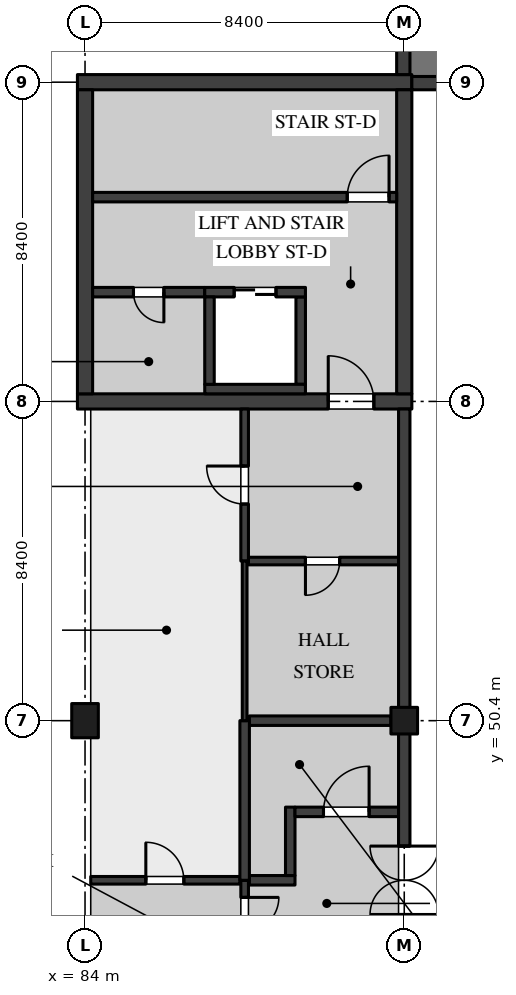
"""IFC4 building model, lengths in metres.
Left out: names, types, materials, properties, quantities, classifications, styles, units other than length and angle.
Written with IfcOpenShell. Run it as: python <this file> out.ifc"""

import sys

from ifc_helpers import new_model, si_unit, direction, frame, frame_2d, origin, origin_2d, place, context, subcontext, project, spatial, rectangle, extrude, element, fill, save


model = new_model("IFC4")
c1 = context("Model", 3, precision=1e-05, world=origin(), true_north=direction((0.0, 1.0)))
c2 = subcontext(c1, "Body", "Model", "MODEL_VIEW")
j1 = project(units=[si_unit("LENGTHUNIT", "METRE"), si_unit("PLANEANGLEUNIT", "RADIAN")], contexts=[c1])
p1 = place(None, origin())
s1 = spatial("IfcSite", under=j1, at=p1, CompositionType="ELEMENT")
p2 = place(p1, origin())
s2 = spatial("IfcBuilding", under=s1, at=p2, CompositionType="ELEMENT")
p3 = place(p2, frame((0.0, 0.0, 5.4)))
s3 = spatial("IfcBuildingStorey", under=s2, at=p3, CompositionType="ELEMENT", Elevation=5.4)
p4 = place(p3, frame((84.0, 50.4, 0.0), z_axis=(0.0, 0.0, 1.0), x_axis=(1.0, 0.0, 0.0)))
e1 = element("IfcColumn", 1, at=p4, inside=s3, PredefinedType="COLUMN", context=c2, shape_type="SweptSolid", body=[
    extrude(rectangle(XDim=0.7, YDim=0.9, at=origin_2d()), origin(), (0.0, 0.0, 1.0), 4.5),
])
p5 = place(p3, frame((92.4, 50.4, 0.0), z_axis=(0.0, 0.0, 1.0), x_axis=(1.0, 0.0, 0.0)))
e2 = element("IfcColumn", 2, at=p5, inside=s3, PredefinedType="COLUMN", context=c2, shape_type="SweptSolid", body=[
    extrude(rectangle(XDim=0.7, YDim=0.7, at=origin_2d()), origin(), (0.0, 0.0, 1.0), 4.5),
])
p6 = place(p3, frame((83.8, 58.8, 0.0), z_axis=(0.0, 0.0, 1.0), x_axis=(1.0, 0.0, 0.0)))
e3 = element("IfcWall", 3, at=p6, inside=s3, PredefinedType="SHEAR", context=c2, shape_type="SweptSolid", body=[
    extrude(rectangle(XDim=8.8, YDim=0.4, at=frame_2d((4.4, 0.0))), origin(), (0.0, 0.0, 1.0), 4.25),
])
p7 = place(p6, frame((6.6, 0.0, 0.0)))
e4 = element("IfcOpeningElement", 4, at=p7, cuts=e3, PredefinedType="OPENING", context=c2, shape_type="SweptSolid", body=[
    extrude(rectangle(XDim=1.2, YDim=2.1, at=frame_2d((0.6, 1.05))), frame((0.0, 0.21, 0.0), z_axis=(0.0, -1.0, 0.0), x_axis=(1.0, 0.0, 0.0)), (0.0, 0.0, 1.0), 0.42),
])
p8 = place(p3, frame((83.8, 67.2, 0.0), z_axis=(0.0, 0.0, 1.0), x_axis=(1.0, 0.0, 0.0)))
e5 = element("IfcWall", 5, at=p8, inside=s3, PredefinedType="SHEAR", context=c2, shape_type="SweptSolid", body=[
    extrude(rectangle(XDim=8.8, YDim=0.4, at=frame_2d((4.4, 0.0))), origin(), (0.0, 0.0, 1.0), 4.25),
])
for number, where, z_axis, x_axis in (
    (6, (84.0, 59.0, 0.0), (0.0, 0.0, 1.0), (0.0, 1.0, 0.0)),
    (7, (92.4, 59.0, 0.0), (0.0, 0.0, 1.0), (0.0, 1.0, 0.0)),
):
    element("IfcWall", number, at=place(p3, frame(where, z_axis=z_axis, x_axis=x_axis)), inside=s3, PredefinedType="SHEAR", context=c2, shape_type="SweptSolid", body=[
        extrude(rectangle(XDim=8.0, YDim=0.4, at=frame_2d((4.0, 0.0))), origin(), (0.0, 0.0, 1.0), 4.25),
    ])
p9 = place(p3, frame((92.2, 64.175, 0.0), z_axis=(0.0, 0.0, 1.0), x_axis=(-1.0, 0.0, 0.0)))
e8 = element("IfcWall", 8, at=p9, inside=s3, PredefinedType="SOLIDWALL", context=c2, shape_type="SweptSolid", body=[
    extrude(rectangle(XDim=8.0, YDim=0.25, at=frame_2d((4.0, 0.0))), origin(), (0.0, 0.0, 1.0), 4.25),
])
p10 = place(p9, frame((0.2, 0.0, 0.0)))
e9 = element("IfcOpeningElement", 9, at=p10, cuts=e8, PredefinedType="OPENING", context=c2, shape_type="SweptSolid", body=[
    extrude(rectangle(XDim=1.1, YDim=2.1, at=frame_2d((0.55, 1.05))), frame((0.0, 0.135, 0.0), z_axis=(0.0, -1.0, 0.0), x_axis=(1.0, 0.0, 0.0)), (0.0, 0.0, 1.0), 0.27),
])
p11 = place(p3, frame((87.15, 61.675, 0.0), z_axis=(0.0, 0.0, 1.0), x_axis=(-1.0, 0.0, 0.0)))
e10 = element("IfcWall", 10, at=p11, inside=s3, PredefinedType="SOLIDWALL", context=c2, shape_type="SweptSolid", body=[
    extrude(rectangle(XDim=2.95, YDim=0.25, at=frame_2d((1.475, 0.0))), origin(), (0.0, 0.0, 1.0), 4.25),
])
p12 = place(p11, frame((1.075, 0.0, 0.0)))
e11 = element("IfcOpeningElement", 11, at=p12, cuts=e10, PredefinedType="OPENING", context=c2, shape_type="SweptSolid", body=[
    extrude(rectangle(XDim=0.8, YDim=2.1, at=frame_2d((0.4, 1.05))), frame((0.0, 0.135, 0.0), z_axis=(0.0, -1.0, 0.0), x_axis=(1.0, 0.0, 0.0)), (0.0, 0.0, 1.0), 0.27),
])
p13 = place(p3, frame((89.675, 59.25, 0.0), z_axis=(0.0, 0.0, 1.0), x_axis=(0.0, 1.0, 0.0)))
e12 = element("IfcWall", 12, at=p13, inside=s3, PredefinedType="SOLIDWALL", context=c2, shape_type="SweptSolid", body=[
    extrude(rectangle(XDim=2.3, YDim=0.25, at=frame_2d((1.15, 0.0))), origin(), (0.0, 0.0, 1.0), 4.25),
])
p14 = place(p3, frame((87.15, 61.675, 0.0), z_axis=(0.0, 0.0, 1.0), x_axis=(1.0, 0.0, 0.0)))
e13 = element("IfcWall", 13, at=p14, inside=s3, PredefinedType="SOLIDWALL", context=c2, shape_type="SweptSolid", body=[
    extrude(rectangle(XDim=2.65, YDim=0.25, at=frame_2d((1.325, 0.0))), origin(), (0.0, 0.0, 1.0), 4.25),
])
p15 = place(p14, frame((0.775, 0.0, 0.0)))
e14 = element("IfcOpeningElement", 14, at=p15, cuts=e13, PredefinedType="OPENING", context=c2, shape_type="SweptSolid", body=[
    extrude(rectangle(XDim=1.1, YDim=2.1, at=frame_2d((0.55, 1.05))), frame((0.0, 0.135, 0.0), z_axis=(0.0, -1.0, 0.0), x_axis=(1.0, 0.0, 0.0)), (0.0, 0.0, 1.0), 0.27),
])
p16 = place(p3, frame((87.15, 59.125, 0.0), z_axis=(0.0, 0.0, 1.0), x_axis=(1.0, 0.0, 0.0)))
e15 = element("IfcWall", 15, at=p16, inside=s3, PredefinedType="SOLIDWALL", context=c2, shape_type="SweptSolid", body=[
    extrude(rectangle(XDim=2.65, YDim=0.25, at=frame_2d((1.325, 0.0))), origin(), (0.0, 0.0, 1.0), 4.25),
])
p17 = place(p3, frame((87.275, 59.25, 0.0), z_axis=(0.0, 0.0, 1.0), x_axis=(0.0, 1.0, 0.0)))
e16 = element("IfcWall", 16, at=p17, inside=s3, PredefinedType="SOLIDWALL", context=c2, shape_type="SweptSolid", body=[
    extrude(rectangle(XDim=2.3, YDim=0.25, at=frame_2d((1.15, 0.0))), origin(), (0.0, 0.0, 1.0), 4.25),
])
p18 = place(p2, origin())
s4 = spatial("IfcBuildingStorey", under=s2, at=p18, CompositionType="ELEMENT", Elevation=0.0)
p19 = place(p18, frame((84.0, 54.6, 0.0), z_axis=(0.0, 0.0, 1.0), x_axis=(0.0, 1.0, 0.0)))
e17 = element("IfcWall", 17, at=p19, inside=s4, PredefinedType="PARTITIONING", context=c2, shape_type="SweptSolid", body=[
    extrude(rectangle(XDim=4.0, YDim=0.2, at=frame_2d((2.0, 0.0))), origin(), (0.0, 0.0, 1.0), 18.77),
])
p20 = place(p19, frame((1.5, 0.0, 0.0)))
e18 = element("IfcOpeningElement", 18, at=p20, cuts=e17, PredefinedType="OPENING", context=c2, shape_type="SweptSolid", body=[
    extrude(rectangle(XDim=1.0, YDim=2.4, at=frame_2d((0.5, 1.2))), frame((0.0, 0.11, 0.0), z_axis=(0.0, -1.0, 0.0), x_axis=(1.0, 0.0, 0.0)), (0.0, 0.0, 1.0), 0.22),
])
p21 = place(p18, frame((84.0, 42.2, 0.0), z_axis=(0.0, 0.0, 1.0), x_axis=(0.0, 1.0, 0.0)))
e19 = element("IfcWall", 19, at=p21, inside=s4, PredefinedType="PARTITIONING", context=c2, shape_type="SweptSolid", body=[
    extrude(rectangle(XDim=4.0, YDim=0.2, at=frame_2d((2.0, 0.0))), origin(), (0.0, 0.0, 1.0), 18.77),
])
p22 = place(p21, frame((1.5, 0.0, 0.0)))
e20 = element("IfcOpeningElement", 20, at=p22, cuts=e19, PredefinedType="OPENING", context=c2, shape_type="SweptSolid", body=[
    extrude(rectangle(XDim=1.0, YDim=2.4, at=frame_2d((0.5, 1.2))), frame((0.0, 0.11, 0.0), z_axis=(0.0, -1.0, 0.0), x_axis=(1.0, 0.0, 0.0)), (0.0, 0.0, 1.0), 0.22),
])
p23 = place(p18, frame((84.0, 46.2, 0.0), z_axis=(0.0, 0.0, 1.0), x_axis=(0.0, 1.0, 0.0)))
e21 = element("IfcWall", 21, at=p23, inside=s4, PredefinedType="PARTITIONING", context=c2, shape_type="SweptSolid", body=[
    extrude(rectangle(XDim=2.4, YDim=0.125, at=frame_2d((1.2, 0.0))), origin(), (0.0, 0.0, 1.0), 18.77),
])
p24 = place(p18, frame((84.0, 48.6, 0.0), z_axis=(0.0, 0.0, 1.0), x_axis=(0.0, 1.0, 0.0)))
e22 = element("IfcWall", 22, at=p24, inside=s4, PredefinedType="PARTITIONING", context=c2, shape_type="SweptSolid", body=[
    extrude(rectangle(XDim=1.35, YDim=0.125, at=frame_2d((0.675, 0.0))), origin(), (0.0, 0.0, 1.0), 18.77),
])
p25 = place(p18, frame((84.0, 50.85, 0.0), z_axis=(0.0, 0.0, 1.0), x_axis=(0.0, 1.0, 0.0)))
e23 = element("IfcWall", 23, at=p25, inside=s4, PredefinedType="PARTITIONING", context=c2, shape_type="SweptSolid", body=[
    extrude(rectangle(XDim=3.75, YDim=0.125, at=frame_2d((1.875, 0.0))), origin(), (0.0, 0.0, 1.0), 18.77),
])
p26 = place(p18, frame((79.9, 63.0, 0.0), z_axis=(0.0, 0.0, 1.0), x_axis=(1.0, 0.0, 0.0)))
e24 = element("IfcWall", 24, at=p26, inside=s4, PredefinedType="PARTITIONING", context=c2, shape_type="SweptSolid", body=[
    extrude(rectangle(XDim=3.9, YDim=0.2, at=frame_2d((1.95, 0.0))), origin(), (0.0, 0.0, 1.0), 18.77),
])
p27 = place(p26, frame((1.45, 0.0, 0.0)))
e25 = element("IfcOpeningElement", 25, at=p27, cuts=e24, PredefinedType="OPENING", context=c2, shape_type="SweptSolid", body=[
    extrude(rectangle(XDim=1.0, YDim=2.1, at=frame_2d((0.5, 1.05))), frame((0.0, 0.11, 0.0), z_axis=(0.0, -1.0, 0.0), x_axis=(1.0, 0.0, 0.0)), (0.0, 0.0, 1.0), 0.22),
])
p28 = place(p3, frame((88.2, 44.4, 0.0), z_axis=(0.0, 0.0, 1.0), x_axis=(0.0, 1.0, 0.0)))
e26 = element("IfcWall", 26, at=p28, inside=s3, PredefinedType="PARTITIONING", context=c2, shape_type="SweptSolid", body=[
    extrude(rectangle(XDim=1.8, YDim=0.2, at=frame_2d((0.9, 0.0))), origin(), (0.0, 0.0, 1.0), 4.25),
])
p29 = place(p28, frame((0.45, 0.0, 0.0)))
e27 = element("IfcOpeningElement", 27, at=p29, cuts=e26, PredefinedType="OPENING", context=c2, shape_type="SweptSolid", body=[
    extrude(rectangle(XDim=0.9, YDim=2.1, at=frame_2d((0.45, 1.05))), frame((0.0, 0.11, 0.0), z_axis=(0.0, -1.0, 0.0), x_axis=(1.0, 0.0, 0.0)), (0.0, 0.0, 1.0), 0.22),
])
p30 = place(p3, frame((88.325, 46.2, 0.0), z_axis=(0.0, 0.0, 1.0), x_axis=(1.0, 0.0, 0.0)))
e28 = element("IfcWall", 28, at=p30, inside=s3, PredefinedType="PARTITIONING", context=c2, shape_type="SweptSolid", body=[
    extrude(rectangle(XDim=1.2, YDim=0.25, at=frame_2d((0.6, 0.0))), origin(), (0.0, 0.0, 1.0), 4.25),
])
p31 = place(p3, frame((89.4, 46.325, 0.0), z_axis=(0.0, 0.0, 1.0), x_axis=(0.0, 1.0, 0.0)))
e29 = element("IfcWall", 29, at=p31, inside=s3, PredefinedType="PARTITIONING", context=c2, shape_type="SweptSolid", body=[
    extrude(rectangle(XDim=1.8, YDim=0.25, at=frame_2d((0.9, 0.0))), origin(), (0.0, 0.0, 1.0), 4.25),
])
p32 = place(p3, frame((89.525, 48.0, 0.0), z_axis=(0.0, 0.0, 1.0), x_axis=(1.0, 0.0, 0.0)))
e30 = element("IfcWall", 30, at=p32, inside=s3, PredefinedType="PARTITIONING", context=c2, shape_type="SweptSolid", body=[
    extrude(rectangle(XDim=2.725, YDim=0.25, at=frame_2d((1.363, 0.0))), origin(), (0.0, 0.0, 1.0), 4.25),
])
p33 = place(p32, frame((0.75, 0.0, 0.0)))
e31 = element("IfcOpeningElement", 31, at=p33, cuts=e30, PredefinedType="OPENING", context=c2, shape_type="SweptSolid", body=[
    extrude(rectangle(XDim=1.2, YDim=2.4, at=frame_2d((0.6, 1.2))), frame((0.0, 0.135, 0.0), z_axis=(0.0, -1.0, 0.0), x_axis=(1.0, 0.0, 0.0)), (0.0, 0.0, 1.0), 0.27),
])
p34 = place(p3, frame((88.3, 54.6, 0.0), z_axis=(0.0, 0.0, 1.0), x_axis=(1.0, 0.0, 0.0)))
e32 = element("IfcWall", 32, at=p34, inside=s3, PredefinedType="PARTITIONING", context=c2, shape_type="SweptSolid", body=[
    extrude(rectangle(XDim=3.95, YDim=0.2, at=frame_2d((1.975, 0.0))), origin(), (0.0, 0.0, 1.0), 4.25),
])
p35 = place(p34, frame((1.5, 0.0, 0.0)))
e33 = element("IfcOpeningElement", 33, at=p35, cuts=e32, PredefinedType="OPENING", context=c2, shape_type="SweptSolid", body=[
    extrude(rectangle(XDim=0.9, YDim=2.1, at=frame_2d((0.45, 1.05))), frame((0.0, 0.11, 0.0), z_axis=(0.0, -1.0, 0.0), x_axis=(1.0, 0.0, 0.0)), (0.0, 0.0, 1.0), 0.22),
])
p36 = place(p3, frame((88.2, 54.6, 0.0), z_axis=(0.0, 0.0, 1.0), x_axis=(0.0, 1.0, 0.0)))
e34 = element("IfcWall", 34, at=p36, inside=s3, PredefinedType="PARTITIONING", context=c2, shape_type="SweptSolid", body=[
    extrude(rectangle(XDim=4.0, YDim=0.2, at=frame_2d((2.0, 0.0))), origin(), (0.0, 0.0, 1.0), 4.25),
])
p37 = place(p36, frame((1.5, 0.0, 0.0)))
e35 = element("IfcOpeningElement", 35, at=p37, cuts=e34, PredefinedType="OPENING", context=c2, shape_type="SweptSolid", body=[
    extrude(rectangle(XDim=1.0, YDim=2.4, at=frame_2d((0.5, 1.2))), frame((0.0, 0.11, 0.0), z_axis=(0.0, -1.0, 0.0), x_axis=(1.0, 0.0, 0.0)), (0.0, 0.0, 1.0), 0.22),
])
p38 = place(p3, frame((84.15, 46.2, 0.0), z_axis=(0.0, 0.0, 1.0), x_axis=(1.0, 0.0, 0.0)))
e36 = element("IfcWall", 36, at=p38, inside=s3, PredefinedType="PARTITIONING", context=c2, shape_type="SweptSolid", body=[
    extrude(rectangle(XDim=3.925, YDim=0.2, at=frame_2d((1.962, 0.0))), origin(), (0.0, 0.0, 1.0), 4.25),
])
p39 = place(p38, frame((1.45, 0.0, 0.0)))
e37 = element("IfcOpeningElement", 37, at=p39, cuts=e36, PredefinedType="OPENING", context=c2, shape_type="SweptSolid", body=[
    extrude(rectangle(XDim=1.0, YDim=2.4, at=frame_2d((0.5, 1.2))), frame((0.0, 0.11, 0.0), z_axis=(0.0, -1.0, 0.0), x_axis=(1.0, 0.0, 0.0)), (0.0, 0.0, 1.0), 0.22),
])
p40 = place(p3, frame((88.325, 50.4, 0.0), z_axis=(0.0, 0.0, 1.0), x_axis=(1.0, 0.0, 0.0)))
e38 = element("IfcWall", 38, at=p40, inside=s3, PredefinedType="PARTITIONING", context=c2, shape_type="SweptSolid", body=[
    extrude(rectangle(XDim=3.725, YDim=0.25, at=frame_2d((1.863, 0.0))), origin(), (0.0, 0.0, 1.0), 4.25),
])
p41 = place(p3, frame((88.2, 46.2, 0.0), z_axis=(0.0, 0.0, 1.0), x_axis=(0.0, 1.0, 0.0)))
e39 = element("IfcWall", 39, at=p41, inside=s3, PredefinedType="PARTITIONING", context=c2, shape_type="SweptSolid", body=[
    extrude(rectangle(XDim=4.2, YDim=0.25, at=frame_2d((2.1, 0.0))), origin(), (0.0, 0.0, 1.0), 4.25),
])
p42 = place(p3, frame((88.2, 50.4, 0.0), z_axis=(0.0, 0.0, 1.0), x_axis=(0.0, 1.0, 0.0)))
e40 = element("IfcWall", 40, at=p42, inside=s3, PredefinedType="PARTITIONING", context=c2, shape_type="SweptSolid", body=[
    extrude(rectangle(XDim=4.2, YDim=0.125, at=frame_2d((2.1, 0.0))), origin(), (0.0, 0.0, 1.0), 4.25),
])
p43 = place(p3, frame((92.375, 75.4, 0.0), z_axis=(0.0, 0.0, 1.0), x_axis=(0.0, -1.0, 0.0)))
e41 = element("IfcWall", 41, at=p43, inside=s3, PredefinedType="SOLIDWALL", context=c2, shape_type="SweptSolid", body=[
    extrude(rectangle(XDim=8.0, YDim=0.35, at=frame_2d((4.0, 0.0))), origin(), (0.0, 0.0, 1.0), 3.746),
])
p44 = place(p43, frame((2.8, 0.0, 1.5)))
e42 = element("IfcOpeningElement", 42, at=p44, cuts=e41, PredefinedType="OPENING", context=c2, shape_type="SweptSolid", body=[
    extrude(rectangle(XDim=0.3, YDim=1.5, at=frame_2d((0.15, 0.75))), frame((0.0, 0.185, 0.0), z_axis=(0.0, -1.0, 0.0), x_axis=(1.0, 0.0, 0.0)), (0.0, 0.0, 1.0), 0.37),
])
p45 = place(p43, frame((4.45, 0.0, 1.5)))
e43 = element("IfcOpeningElement", 43, at=p45, cuts=e41, PredefinedType="OPENING", context=c2, shape_type="SweptSolid", body=[
    extrude(rectangle(XDim=1.2, YDim=1.5, at=frame_2d((0.6, 0.75))), frame((0.0, 0.185, 0.0), z_axis=(0.0, -1.0, 0.0), x_axis=(1.0, 0.0, 0.0)), (0.0, 0.0, 1.0), 0.37),
])
p46 = place(p43, frame((7.0, 0.0, 1.5)))
e44 = element("IfcOpeningElement", 44, at=p46, cuts=e41, PredefinedType="OPENING", context=c2, shape_type="SweptSolid", body=[
    extrude(rectangle(XDim=0.3, YDim=1.5, at=frame_2d((0.15, 0.75))), frame((0.0, 0.185, 0.0), z_axis=(0.0, -1.0, 0.0), x_axis=(1.0, 0.0, 0.0)), (0.0, 0.0, 1.0), 0.37),
])
p47 = place(p3, frame((92.6, 67.175, 0.0), z_axis=(0.0, 0.0, 1.0), x_axis=(1.0, 0.0, 0.0)))
e45 = element("IfcWall", 45, at=p47, inside=s3, PredefinedType="SOLIDWALL", context=c2, shape_type="SweptSolid", body=[
    extrude(rectangle(XDim=7.77, YDim=0.35, at=frame_2d((3.885, 0.0))), origin(), (0.0, 0.0, 1.0), 3.746),
])
p48 = place(p47, frame((0.7, 0.0, 1.5)))
e46 = element("IfcOpeningElement", 46, at=p48, cuts=e45, PredefinedType="OPENING", context=c2, shape_type="SweptSolid", body=[
    extrude(rectangle(XDim=0.3, YDim=1.5, at=frame_2d((0.15, 0.75))), frame((0.0, 0.185, 0.0), z_axis=(0.0, -1.0, 0.0), x_axis=(1.0, 0.0, 0.0)), (0.0, 0.0, 1.0), 0.37),
])
p49 = place(p47, frame((2.35, 0.0, 1.5)))
e47 = element("IfcOpeningElement", 47, at=p49, cuts=e45, PredefinedType="OPENING", context=c2, shape_type="SweptSolid", body=[
    extrude(rectangle(XDim=1.2, YDim=1.5, at=frame_2d((0.6, 0.75))), frame((0.0, 0.185, 0.0), z_axis=(0.0, -1.0, 0.0), x_axis=(1.0, 0.0, 0.0)), (0.0, 0.0, 1.0), 0.37),
])
p50 = place(p47, frame((4.9, 0.0, 1.5)))
e48 = element("IfcOpeningElement", 48, at=p50, cuts=e45, PredefinedType="OPENING", context=c2, shape_type="SweptSolid", body=[
    extrude(rectangle(XDim=0.3, YDim=1.5, at=frame_2d((0.15, 0.75))), frame((0.0, 0.185, 0.0), z_axis=(0.0, -1.0, 0.0), x_axis=(1.0, 0.0, 0.0)), (0.0, 0.0, 1.0), 0.37),
])
p51 = place(p3, frame((92.4, 42.2, 0.0), z_axis=(0.0, 0.0, 1.0), x_axis=(0.0, 1.0, 0.0)))
e49 = element("IfcWall", 49, at=p51, inside=s3, PredefinedType="SOLIDWALL", context=c2, shape_type="SweptSolid", body=[
    extrude(rectangle(XDim=7.87, YDim=0.3, at=frame_2d((3.935, 0.0))), origin(), (0.0, 0.0, 1.0), 4.5),
])
p52 = place(p51, frame((3.1, 0.0, 0.0)))
e50 = element("IfcOpeningElement", 50, at=p52, cuts=e49, PredefinedType="OPENING", context=c2, shape_type="SweptSolid", body=[
    extrude(rectangle(XDim=1.8, YDim=2.4, at=frame_2d((0.9, 1.2))), frame((0.0, 0.16, 0.0), z_axis=(0.0, -1.0, 0.0), x_axis=(1.0, 0.0, 0.0)), (0.0, 0.0, 1.0), 0.32),
])
p53 = place(p3, frame((92.4, 50.73, 0.0), z_axis=(0.0, 0.0, 1.0), x_axis=(0.0, 1.0, 0.0)))
e51 = element("IfcWall", 51, at=p53, inside=s3, PredefinedType="SOLIDWALL", context=c2, shape_type="SweptSolid", body=[
    extrude(rectangle(XDim=7.87, YDim=0.3, at=frame_2d((3.935, 0.0))), origin(), (0.0, 0.0, 1.0), 4.5),
])
p54 = place(p7, origin())
e52 = element("IfcDoor", 52, at=p54, inside=s3, OperationType="SINGLE_SWING_RIGHT", PredefinedType="DOOR", context=c2, shape_type="SweptSolid", body=[
    extrude(rectangle(XDim=1.2, YDim=2.1, at=frame_2d((0.6, 1.05))), frame((0.0, 0.035, 0.0), z_axis=(0.0, -1.0, 0.0), x_axis=(1.0, 0.0, 0.0)), (0.0, 0.0, 1.0), 0.07),
])
fill(e4, e52)
p55 = place(p12, origin())
e53 = element("IfcDoor", 53, at=p55, inside=s3, OperationType="SINGLE_SWING_RIGHT", PredefinedType="DOOR", context=c2, shape_type="SweptSolid", body=[
    extrude(rectangle(XDim=0.8, YDim=2.1, at=frame_2d((0.4, 1.05))), frame((0.0, 0.035, 0.0), z_axis=(0.0, -1.0, 0.0), x_axis=(1.0, 0.0, 0.0)), (0.0, 0.0, 1.0), 0.07),
])
fill(e11, e53)
p56 = place(p10, frame((1.1, 0.0, 0.0), z_axis=(0.0, 0.0, 1.0), x_axis=(-1.0, 0.0, 0.0)))
e54 = element("IfcDoor", 54, at=p56, inside=s3, OperationType="SINGLE_SWING_LEFT", PredefinedType="DOOR", context=c2, shape_type="SweptSolid", body=[
    extrude(rectangle(XDim=1.1, YDim=2.1, at=frame_2d((0.55, 1.05))), frame((0.0, 0.035, 0.0), z_axis=(0.0, -1.0, 0.0), x_axis=(1.0, 0.0, 0.0)), (0.0, 0.0, 1.0), 0.07),
])
fill(e9, e54)
p57 = place(p15, origin())
e55 = element("IfcDoor", 55, at=p57, inside=s3, OperationType="DOUBLE_DOOR_SLIDING", PredefinedType="DOOR", context=c2, shape_type="SweptSolid", body=[
    extrude(rectangle(XDim=1.1, YDim=2.1, at=frame_2d((0.55, 1.05))), frame((0.0, 0.04, 0.0), z_axis=(0.0, -1.0, 0.0), x_axis=(1.0, 0.0, 0.0)), (0.0, 0.0, 1.0), 0.08),
])
fill(e14, e55)
p58 = place(p29, frame((0.9, 0.0, 0.0), z_axis=(0.0, 0.0, 1.0), x_axis=(-1.0, 0.0, 0.0)))
e56 = element("IfcDoor", 56, at=p58, inside=s3, OperationType="SINGLE_SWING_RIGHT", PredefinedType="DOOR", context=c2, shape_type="SweptSolid", body=[
    extrude(rectangle(XDim=0.9, YDim=2.1, at=frame_2d((0.45, 1.05))), frame((0.0, 0.03, 0.0), z_axis=(0.0, -1.0, 0.0), x_axis=(1.0, 0.0, 0.0)), (0.0, 0.0, 1.0), 0.06),
])
fill(e27, e56)
p59 = place(p33, origin())
e57 = element("IfcDoor", 57, at=p59, inside=s3, OperationType="SINGLE_SWING_LEFT", PredefinedType="DOOR", context=c2, shape_type="SweptSolid", body=[
    extrude(rectangle(XDim=1.2, YDim=2.4, at=frame_2d((0.6, 1.2))), frame((0.0, 0.05, 0.0), z_axis=(0.0, -1.0, 0.0), x_axis=(1.0, 0.0, 0.0)), (0.0, 0.0, 1.0), 0.1),
])
fill(e31, e57)
p60 = place(p35, frame((0.9, 0.0, 0.0), z_axis=(0.0, 0.0, 1.0), x_axis=(-1.0, 0.0, 0.0)))
e58 = element("IfcDoor", 58, at=p60, inside=s3, OperationType="SINGLE_SWING_LEFT", PredefinedType="DOOR", context=c2, shape_type="SweptSolid", body=[
    extrude(rectangle(XDim=0.9, YDim=2.1, at=frame_2d((0.45, 1.05))), frame((0.0, 0.03, 0.0), z_axis=(0.0, -1.0, 0.0), x_axis=(1.0, 0.0, 0.0)), (0.0, 0.0, 1.0), 0.06),
])
fill(e33, e58)
p61 = place(p37, origin())
e59 = element("IfcDoor", 59, at=p61, inside=s3, OperationType="SINGLE_SWING_LEFT", PredefinedType="DOOR", context=c2, shape_type="SweptSolid", body=[
    extrude(rectangle(XDim=1.0, YDim=2.4, at=frame_2d((0.5, 1.2))), frame((0.0, 0.035, 0.0), z_axis=(0.0, -1.0, 0.0), x_axis=(1.0, 0.0, 0.0)), (0.0, 0.0, 1.0), 0.07),
])
fill(e35, e59)
p62 = place(p39, origin())
e60 = element("IfcDoor", 60, at=p62, inside=s3, OperationType="SINGLE_SWING_RIGHT", PredefinedType="DOOR", context=c2, shape_type="SweptSolid", body=[
    extrude(rectangle(XDim=1.0, YDim=2.4, at=frame_2d((0.5, 1.2))), frame((0.0, 0.035, 0.0), z_axis=(0.0, -1.0, 0.0), x_axis=(1.0, 0.0, 0.0)), (0.0, 0.0, 1.0), 0.07),
])
fill(e37, e60)
p63 = place(p52, frame((1.8, 0.0, 0.0), z_axis=(0.0, 0.0, 1.0), x_axis=(-1.0, 0.0, 0.0)))
e61 = element("IfcDoor", 61, at=p63, inside=s3, OperationType="DOUBLE_DOOR_DOUBLE_SWING", PredefinedType="DOOR", context=c2, shape_type="SweptSolid", body=[
    extrude(rectangle(XDim=1.8, YDim=2.4, at=frame_2d((0.9, 1.2))), frame((0.0, 0.025, 0.0), z_axis=(0.0, -1.0, 0.0), x_axis=(1.0, 0.0, 0.0)), (0.0, 0.0, 1.0), 0.05),
])
fill(e50, e61)
save(model, sys.argv[1])
